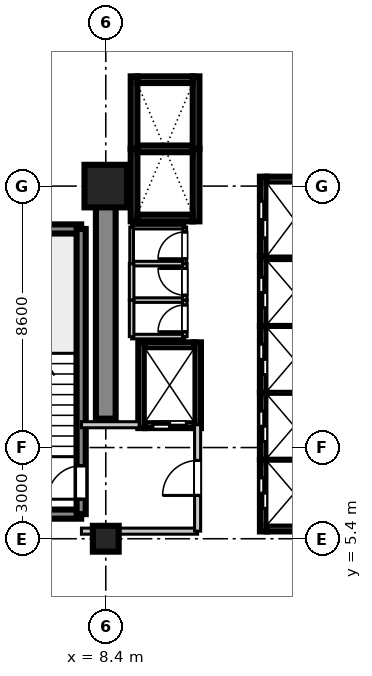
"""IFC4 building model, lengths in metres.
Left out: names, types, materials, properties, quantities, classifications, styles, units other than length and angle.
Written with IfcOpenShell. Run it as: python <this file> out.ifc"""

import sys

from ifc_helpers import new_model, si_unit, direction, frame, frame_2d, origin, origin_2d, place, context, subcontext, project, spatial, rectangle, extrude, source, transform, mapped, element, fill, save


model = new_model("IFC4")
c1 = context("Model", 3, precision=1e-05, world=origin(), true_north=direction((0.0, 1.0)))
c2 = subcontext(c1, "Body", "Model", "MODEL_VIEW")
j1 = project(units=[si_unit("LENGTHUNIT", "METRE"), si_unit("PLANEANGLEUNIT", "RADIAN")], contexts=[c1])
p1 = place(None, origin())
s1 = spatial("IfcSite", under=j1, at=p1, CompositionType="ELEMENT")
p2 = place(p1, origin())
s2 = spatial("IfcBuilding", under=s1, at=p2, CompositionType="ELEMENT")
p3 = place(p2, frame((0.0, 0.0, 54.3)))
s3 = spatial("IfcBuildingStorey", under=s2, at=p3, CompositionType="ELEMENT", Elevation=54.3)
m1 = source(origin(), c2, "Body", "SweptSolid", [
    extrude(rectangle(XDim=0.85, YDim=0.85, at=origin_2d()), origin(), (0.0, 0.0, 1.0), 3.605),
])
p4 = place(p3, frame((8.4, 5.4, 0.0), z_axis=(0.0, 0.0, 1.0), x_axis=(1.0, 0.0, 0.0)))
e1 = element("IfcColumn", 1, at=p4, inside=s3, PredefinedType="PILASTER", context=c2, shape_type="MappedRepresentation", body=[
    mapped(m1, transform((0.0, 0.0, 0.0), scale=1.0)),
])
m2 = source(origin(), c2, "Body", "SweptSolid", [
    extrude(rectangle(XDim=1.4, YDim=1.4, at=origin_2d()), origin(), (0.0, 0.0, 1.0), 3.605),
])
p5 = place(p3, frame((8.4, 17.0, 0.0), z_axis=(0.0, 0.0, 1.0), x_axis=(1.0, 0.0, 0.0)))
e2 = element("IfcColumn", 2, at=p5, inside=s3, PredefinedType="COLUMN", context=c2, shape_type="MappedRepresentation", body=[
    mapped(m2, transform((0.0, 0.0, 0.0), scale=1.0)),
])
m3 = source(origin(), c2, "Body", "SweptSolid", [
    extrude(rectangle(XDim=7.65, YDim=0.65, at=frame_2d((3.825, 0.0))), origin(), (0.0, 0.0, 1.0), 3.37),
])
p6 = place(p3, frame((8.4, 9.35, 0.0), z_axis=(0.0, 0.0, 1.0), x_axis=(0.0, 1.0, 0.0)))
e3 = element("IfcWall", 3, at=p6, inside=s3, PredefinedType="SHEAR", context=c2, shape_type="MappedRepresentation", body=[
    mapped(m3, transform((0.0, 0.0, 0.0), scale=1.0)),
])
m4 = source(origin(), c2, "Body", "SweptSolid", [
    extrude(rectangle(XDim=3.98, YDim=0.3, at=frame_2d((1.99, 0.0))), origin(), (0.0, 0.0, 1.0), 3.37),
])
for number, where, z_axis, x_axis in (
    (4, (3.61, 6.21, 0.0), (0.0, 0.0, 1.0), (1.0, 0.0, 0.0)),
    (5, (3.61, 15.59, 0.0), (0.0, 0.0, 1.0), (1.0, 0.0, 0.0)),
):
    element("IfcWall", number, at=place(p3, frame(where, z_axis=z_axis, x_axis=x_axis)), inside=s3, PredefinedType="SHEAR", context=c2, shape_type="MappedRepresentation", body=[
        mapped(m4, transform((0.0, 0.0, 0.0), scale=1.0)),
    ])
m5 = source(origin(), c2, "Body", "SweptSolid", [
    extrude(rectangle(XDim=9.38, YDim=0.3, at=frame_2d((4.69, 0.0))), origin(), (0.0, 0.0, 1.0), 3.37),
])
p7 = place(p3, frame((7.59, 6.21, 0.0), z_axis=(0.0, 0.0, 1.0), x_axis=(0.0, 1.0, 0.0)))
e6 = element("IfcWall", 6, at=p7, inside=s3, PredefinedType="SHEAR", context=c2, shape_type="MappedRepresentation", body=[
    mapped(m5, transform((0.0, 0.0, 0.0), scale=1.0)),
])
p8 = place(p7, frame((0.49, 0.0, 0.0)))
e7 = element("IfcOpeningElement", 7, at=p8, cuts=e6, PredefinedType="OPENING", context=c2, shape_type="SweptSolid", body=[
    extrude(rectangle(XDim=1.1, YDim=2.15, at=frame_2d((0.55, 1.075))), frame((0.0, 0.16, 0.0), z_axis=(0.0, -1.0, 0.0), x_axis=(1.0, 0.0, 0.0)), (0.0, 0.0, 1.0), 0.32),
])
m6 = source(origin(), c2, "Body", "SweptSolid", [
    extrude(rectangle(XDim=2.36, YDim=0.22, at=frame_2d((1.18, 0.0))), origin(), (0.0, 0.0, 1.0), 3.37),
])
p9 = place(p3, frame((13.58, 5.64, 0.0), z_axis=(0.0, 0.0, 1.0), x_axis=(0.0, 1.0, 0.0)))
e8 = element("IfcWall", 8, at=p9, inside=s3, PredefinedType="SHEAR", context=c2, shape_type="MappedRepresentation", body=[
    mapped(m6, transform((0.0, 0.0, 0.0), scale=1.0)),
])
p10 = place(p9, frame((0.76, 0.0, 0.0)))
e9 = element("IfcOpeningElement", 9, at=p10, cuts=e8, PredefinedType="OPENING", context=c2, shape_type="SweptSolid", body=[
    extrude(rectangle(XDim=1.0, YDim=2.2, at=frame_2d((0.5, 1.1))), frame((0.0, 0.12, 0.0), z_axis=(0.0, -1.0, 0.0), x_axis=(1.0, 0.0, 0.0)), (0.0, 0.0, 1.0), 0.24),
])
m7 = source(origin(), c2, "Body", "SweptSolid", [
    extrude(rectangle(XDim=1.82, YDim=0.22, at=frame_2d((0.91, 0.0))), origin(), (0.0, 0.0, 1.0), 3.37),
])
p11 = place(p3, frame((13.69, 5.75, 0.0), z_axis=(0.0, 0.0, 1.0), x_axis=(1.0, 0.0, 0.0)))
e10 = element("IfcWall", 10, at=p11, inside=s3, PredefinedType="SHEAR", context=c2, shape_type="MappedRepresentation", body=[
    mapped(m7, transform((0.0, 0.0, 0.0), scale=1.0)),
])
m8 = source(origin(), c2, "Body", "SweptSolid", [
    extrude(rectangle(XDim=1.82, YDim=0.22, at=frame_2d((0.91, 0.0))), origin(), (0.0, 0.0, 1.0), 3.65),
])
p12 = place(p3, frame((13.69, 8.0, 0.0), z_axis=(0.0, 0.0, 1.0), x_axis=(1.0, 0.0, 0.0)))
e11 = element("IfcWall", 11, at=p12, inside=s3, PredefinedType="SHEAR", context=c2, shape_type="MappedRepresentation", body=[
    mapped(m8, transform((0.0, 0.0, 0.0), scale=1.0)),
])
m9 = source(origin(), c2, "Body", "SweptSolid", [
    extrude(rectangle(XDim=2.2, YDim=0.22, at=frame_2d((1.1, 0.0))), origin(), (0.0, 0.0, 1.0), 3.37),
])
p13 = place(p3, frame((13.58, 8.0, 0.0), z_axis=(0.0, 0.0, 1.0), x_axis=(0.0, 1.0, 0.0)))
e12 = element("IfcWall", 12, at=p13, inside=s3, PredefinedType="SHEAR", context=c2, shape_type="MappedRepresentation", body=[
    mapped(m9, transform((0.0, 0.0, 0.0), scale=1.0)),
])
p14 = place(p13, frame((0.6, 0.0, 0.0)))
e13 = element("IfcOpeningElement", 13, at=p14, cuts=e12, PredefinedType="OPENING", context=c2, shape_type="SweptSolid", body=[
    extrude(rectangle(XDim=1.0, YDim=2.2, at=frame_2d((0.5, 1.1))), frame((0.0, 0.12, 0.0), z_axis=(0.0, -1.0, 0.0), x_axis=(1.0, 0.0, 0.0)), (0.0, 0.0, 1.0), 0.24),
])
p15 = place(p3, frame((13.69, 10.2, 0.0), z_axis=(0.0, 0.0, 1.0), x_axis=(1.0, 0.0, 0.0)))
e14 = element("IfcWall", 14, at=p15, inside=s3, PredefinedType="SHEAR", context=c2, shape_type="MappedRepresentation", body=[
    mapped(m8, transform((0.0, 0.0, 0.0), scale=1.0)),
])
p16 = place(p3, frame((13.58, 10.2, 0.0), z_axis=(0.0, 0.0, 1.0), x_axis=(0.0, 1.0, 0.0)))
e15 = element("IfcWall", 15, at=p16, inside=s3, PredefinedType="SHEAR", context=c2, shape_type="MappedRepresentation", body=[
    mapped(m9, transform((0.0, 0.0, 0.0), scale=1.0)),
])
p17 = place(p16, frame((0.6, 0.0, 0.0)))
e16 = element("IfcOpeningElement", 16, at=p17, cuts=e15, PredefinedType="OPENING", context=c2, shape_type="SweptSolid", body=[
    extrude(rectangle(XDim=1.0, YDim=2.2, at=frame_2d((0.5, 1.1))), frame((0.0, 0.12, 0.0), z_axis=(0.0, -1.0, 0.0), x_axis=(1.0, 0.0, 0.0)), (0.0, 0.0, 1.0), 0.24),
])
p18 = place(p3, frame((13.69, 12.4, 0.0), z_axis=(0.0, 0.0, 1.0), x_axis=(1.0, 0.0, 0.0)))
e17 = element("IfcWall", 17, at=p18, inside=s3, PredefinedType="SHEAR", context=c2, shape_type="MappedRepresentation", body=[
    mapped(m8, transform((0.0, 0.0, 0.0), scale=1.0)),
])
m10 = source(origin(), c2, "Body", "SweptSolid", [
    extrude(rectangle(XDim=2.3, YDim=0.22, at=frame_2d((1.15, 0.0))), origin(), (0.0, 0.0, 1.0), 3.37),
])
p19 = place(p3, frame((13.58, 12.4, 0.0), z_axis=(0.0, 0.0, 1.0), x_axis=(0.0, 1.0, 0.0)))
e18 = element("IfcWall", 18, at=p19, inside=s3, PredefinedType="SHEAR", context=c2, shape_type="MappedRepresentation", body=[
    mapped(m10, transform((0.0, 0.0, 0.0), scale=1.0)),
])
p20 = place(p19, frame((0.6, 0.0, 0.0)))
e19 = element("IfcOpeningElement", 19, at=p20, cuts=e18, PredefinedType="OPENING", context=c2, shape_type="SweptSolid", body=[
    extrude(rectangle(XDim=1.0, YDim=2.2, at=frame_2d((0.5, 1.1))), frame((0.0, 0.12, 0.0), z_axis=(0.0, -1.0, 0.0), x_axis=(1.0, 0.0, 0.0)), (0.0, 0.0, 1.0), 0.24),
])
p21 = place(p3, frame((13.69, 14.7, 0.0), z_axis=(0.0, 0.0, 1.0), x_axis=(1.0, 0.0, 0.0)))
e20 = element("IfcWall", 20, at=p21, inside=s3, PredefinedType="SHEAR", context=c2, shape_type="MappedRepresentation", body=[
    mapped(m8, transform((0.0, 0.0, 0.0), scale=1.0)),
])
m11 = source(origin(), c2, "Body", "SweptSolid", [
    extrude(rectangle(XDim=2.385, YDim=0.22, at=frame_2d((1.192, 0.0))), origin(), (0.0, 0.0, 1.0), 3.37),
])
for number, where, z_axis, x_axis in (
    (21, (9.33, 15.84, 0.0), (0.0, 0.0, 1.0), (0.0, 1.0, 0.0)),
    (22, (11.37, 15.84, 0.0), (0.0, 0.0, 1.0), (0.0, 1.0, 0.0)),
):
    element("IfcWall", number, at=place(p3, frame(where, z_axis=z_axis, x_axis=x_axis)), inside=s3, PredefinedType="SHEAR", context=c2, shape_type="MappedRepresentation", body=[
        mapped(m11, transform((0.0, 0.0, 0.0), scale=1.0)),
    ])
p22 = place(p3, frame((9.44, 15.95, 0.0), z_axis=(0.0, 0.0, 1.0), x_axis=(1.0, 0.0, 0.0)))
e23 = element("IfcWall", 23, at=p22, inside=s3, PredefinedType="SHEAR", context=c2, shape_type="MappedRepresentation", body=[
    mapped(m7, transform((0.0, 0.0, 0.0), scale=1.0)),
])
p23 = place(p3, frame((9.44, 18.225, 0.0), z_axis=(0.0, 0.0, 1.0), x_axis=(1.0, 0.0, 0.0)))
e24 = element("IfcWall", 24, at=p23, inside=s3, PredefinedType="SHEAR", context=c2, shape_type="MappedRepresentation", body=[
    mapped(m8, transform((0.0, 0.0, 0.0), scale=1.0)),
])
for number, where, z_axis, x_axis in (
    (25, (9.33, 18.225, 0.0), (0.0, 0.0, 1.0), (0.0, 1.0, 0.0)),
    (26, (11.37, 18.225, 0.0), (0.0, 0.0, 1.0), (0.0, 1.0, 0.0)),
):
    element("IfcWall", number, at=place(p3, frame(where, z_axis=z_axis, x_axis=x_axis)), inside=s3, PredefinedType="SHEAR", context=c2, shape_type="MappedRepresentation", body=[
        mapped(m11, transform((0.0, 0.0, 0.0), scale=1.0)),
    ])
p24 = place(p3, frame((9.44, 20.5, 0.0), z_axis=(0.0, 0.0, 1.0), x_axis=(1.0, 0.0, 0.0)))
e27 = element("IfcWall", 27, at=p24, inside=s3, PredefinedType="SHEAR", context=c2, shape_type="MappedRepresentation", body=[
    mapped(m7, transform((0.0, 0.0, 0.0), scale=1.0)),
])
m12 = source(origin(), c2, "Body", "SweptSolid", [
    extrude(rectangle(XDim=2.82, YDim=0.22, at=frame_2d((1.41, 0.0))), origin(), (0.0, 0.0, 1.0), 3.37),
])
for number, where, z_axis, x_axis in (
    (28, (9.58, 9.04, 0.0), (0.0, 0.0, 1.0), (0.0, 1.0, 0.0)),
    (29, (11.42, 9.04, 0.0), (0.0, 0.0, 1.0), (0.0, 1.0, 0.0)),
):
    element("IfcWall", number, at=place(p3, frame(where, z_axis=z_axis, x_axis=x_axis)), inside=s3, PredefinedType="SHEAR", context=c2, shape_type="MappedRepresentation", body=[
        mapped(m12, transform((0.0, 0.0, 0.0), scale=1.0)),
    ])
m13 = source(origin(), c2, "Body", "SweptSolid", [
    extrude(rectangle(XDim=1.62, YDim=0.22, at=frame_2d((0.81, 0.0))), origin(), (0.0, 0.0, 1.0), 3.37),
])
p25 = place(p3, frame((9.69, 9.15, 0.0), z_axis=(0.0, 0.0, 1.0), x_axis=(1.0, 0.0, 0.0)))
e30 = element("IfcWall", 30, at=p25, inside=s3, PredefinedType="SHEAR", context=c2, shape_type="MappedRepresentation", body=[
    mapped(m13, transform((0.0, 0.0, 0.0), scale=1.0)),
])
p26 = place(p25, frame((0.26, 0.0, 0.0)))
e31 = element("IfcOpeningElement", 31, at=p26, cuts=e30, PredefinedType="OPENING", context=c2, shape_type="SweptSolid", body=[
    extrude(rectangle(XDim=1.1, YDim=2.2, at=frame_2d((0.55, 1.1))), frame((0.0, 0.12, 0.0), z_axis=(0.0, -1.0, 0.0), x_axis=(1.0, 0.0, 0.0)), (0.0, 0.0, 1.0), 0.24),
])
p27 = place(p3, frame((9.69, 11.75, 0.0), z_axis=(0.0, 0.0, 1.0), x_axis=(1.0, 0.0, 0.0)))
e32 = element("IfcWall", 32, at=p27, inside=s3, PredefinedType="SHEAR", context=c2, shape_type="MappedRepresentation", body=[
    mapped(m13, transform((0.0, 0.0, 0.0), scale=1.0)),
])
m14 = source(origin(), c2, "Body", "SweptSolid", [
    extrude(rectangle(XDim=2.61, YDim=0.22, at=frame_2d((1.305, 0.0))), origin(), (0.0, 0.0, 1.0), 3.37),
])
p28 = place(p3, frame((13.58, 14.7, 0.0), z_axis=(0.0, 0.0, 1.0), x_axis=(0.0, 1.0, 0.0)))
e33 = element("IfcWall", 33, at=p28, inside=s3, PredefinedType="SHEAR", context=c2, shape_type="MappedRepresentation", body=[
    mapped(m14, transform((0.0, 0.0, 0.0), scale=1.0)),
])
p29 = place(p28, frame((0.6, 0.0, 0.0)))
e34 = element("IfcOpeningElement", 34, at=p29, cuts=e33, PredefinedType="OPENING", context=c2, shape_type="SweptSolid", body=[
    extrude(rectangle(XDim=1.2, YDim=2.2, at=frame_2d((0.6, 1.1))), frame((0.0, 0.12, 0.0), z_axis=(0.0, -1.0, 0.0), x_axis=(1.0, 0.0, 0.0)), (0.0, 0.0, 1.0), 0.24),
])
p30 = place(p3, frame((13.69, 17.2, 0.0), z_axis=(0.0, 0.0, 1.0), x_axis=(1.0, 0.0, 0.0)))
e35 = element("IfcWall", 35, at=p30, inside=s3, PredefinedType="SHEAR", context=c2, shape_type="MappedRepresentation", body=[
    mapped(m7, transform((0.0, 0.0, 0.0), scale=1.0)),
])
m15 = source(origin(), c2, "Body", "SweptSolid", [
    extrude(rectangle(XDim=3.82, YDim=0.2, at=frame_2d((1.91, 0.0))), origin(), (0.0, 0.0, 1.0), 2.71),
])
p31 = place(p3, frame((7.6, 5.65, 0.0), z_axis=(0.0, 0.0, 1.0), x_axis=(1.0, 0.0, 0.0)))
e36 = element("IfcWall", 36, at=p31, inside=s3, PredefinedType="PARTITIONING", context=c2, shape_type="MappedRepresentation", body=[
    mapped(m15, transform((0.0, 0.0, 0.0), scale=1.0)),
])
m16 = source(origin(), c2, "Body", "SweptSolid", [
    extrude(rectangle(XDim=1.9, YDim=0.2, at=frame_2d((0.95, 0.0))), origin(), (0.0, 0.0, 1.0), 2.71),
])
p32 = place(p3, frame((7.6, 9.15, 0.0), z_axis=(0.0, 0.0, 1.0), x_axis=(1.0, 0.0, 0.0)))
e37 = element("IfcWall", 37, at=p32, inside=s3, PredefinedType="PARTITIONING", context=c2, shape_type="MappedRepresentation", body=[
    mapped(m16, transform((0.0, 0.0, 0.0), scale=1.0)),
])
m17 = source(origin(), c2, "Body", "SweptSolid", [
    extrude(rectangle(XDim=3.5, YDim=0.2, at=frame_2d((1.75, 0.0))), origin(), (0.0, 0.0, 1.0), 2.71),
])
p33 = place(p3, frame((11.42, 5.65, 0.0), z_axis=(0.0, 0.0, 1.0), x_axis=(0.0, 1.0, 0.0)))
e38 = element("IfcWall", 38, at=p33, inside=s3, PredefinedType="PARTITIONING", context=c2, shape_type="MappedRepresentation", body=[
    mapped(m17, transform((0.0, 0.0, 0.0), scale=1.0)),
])
p34 = place(p33, frame((1.175, 0.0, 0.0)))
e39 = element("IfcOpeningElement", 39, at=p34, cuts=e38, PredefinedType="OPENING", context=c2, shape_type="SweptSolid", body=[
    extrude(rectangle(XDim=1.15, YDim=2.15, at=frame_2d((0.575, 1.075))), frame((0.0, 0.11, 0.0), z_axis=(0.0, -1.0, 0.0), x_axis=(1.0, 0.0, 0.0)), (0.0, 0.0, 1.0), 0.22),
])
m18 = source(origin(), c2, "Body", "SweptSolid", [
    extrude(rectangle(XDim=1.75, YDim=0.15, at=frame_2d((0.875, 0.0))), origin(), (0.0, 0.0, 1.0), 2.71),
])
for number, where, z_axis, x_axis in (
    (40, (9.25, 12.05, 0.0), (0.0, 0.0, 1.0), (1.0, 0.0, 0.0)),
    (41, (9.25, 13.25, 0.0), (0.0, 0.0, 1.0), (1.0, 0.0, 0.0)),
):
    element("IfcWall", number, at=place(p3, frame(where, z_axis=z_axis, x_axis=x_axis)), inside=s3, PredefinedType="PARTITIONING", context=c2, shape_type="MappedRepresentation", body=[
        mapped(m18, transform((0.0, 0.0, 0.0), scale=1.0)),
    ])
m19 = source(origin(), c2, "Body", "SweptSolid", [
    extrude(rectangle(XDim=1.2, YDim=0.15, at=frame_2d((0.6, 0.0))), origin(), (0.0, 0.0, 1.0), 2.71),
])
p35 = place(p3, frame((9.25, 12.05, 0.0), z_axis=(0.0, 0.0, 1.0), x_axis=(0.0, 1.0, 0.0)))
e42 = element("IfcWall", 42, at=p35, inside=s3, PredefinedType="PARTITIONING", context=c2, shape_type="MappedRepresentation", body=[
    mapped(m19, transform((0.0, 0.0, 0.0), scale=1.0)),
])
p36 = place(p3, frame((11.0, 12.05, 0.0), z_axis=(0.0, 0.0, 1.0), x_axis=(0.0, 1.0, 0.0)))
e43 = element("IfcWall", 43, at=p36, inside=s3, PredefinedType="PARTITIONING", context=c2, shape_type="MappedRepresentation", body=[
    mapped(m19, transform((0.0, 0.0, 0.0), scale=1.0)),
])
p37 = place(p36, frame((0.16, 0.0, 0.0)))
e44 = element("IfcOpeningElement", 44, at=p37, cuts=e43, PredefinedType="OPENING", context=c2, shape_type="SweptSolid", body=[
    extrude(rectangle(XDim=0.88, YDim=2.1, at=frame_2d((0.44, 1.05))), frame((0.0, 0.085, 0.0), z_axis=(0.0, -1.0, 0.0), x_axis=(1.0, 0.0, 0.0)), (0.0, 0.0, 1.0), 0.17),
])
p38 = place(p3, frame((9.25, 14.45, 0.0), z_axis=(0.0, 0.0, 1.0), x_axis=(1.0, 0.0, 0.0)))
e45 = element("IfcWall", 45, at=p38, inside=s3, PredefinedType="PARTITIONING", context=c2, shape_type="MappedRepresentation", body=[
    mapped(m18, transform((0.0, 0.0, 0.0), scale=1.0)),
])
p39 = place(p3, frame((9.25, 13.25, 0.0), z_axis=(0.0, 0.0, 1.0), x_axis=(0.0, 1.0, 0.0)))
e46 = element("IfcWall", 46, at=p39, inside=s3, PredefinedType="PARTITIONING", context=c2, shape_type="MappedRepresentation", body=[
    mapped(m19, transform((0.0, 0.0, 0.0), scale=1.0)),
])
p40 = place(p3, frame((11.0, 13.25, 0.0), z_axis=(0.0, 0.0, 1.0), x_axis=(0.0, 1.0, 0.0)))
e47 = element("IfcWall", 47, at=p40, inside=s3, PredefinedType="PARTITIONING", context=c2, shape_type="MappedRepresentation", body=[
    mapped(m19, transform((0.0, 0.0, 0.0), scale=1.0)),
])
p41 = place(p40, frame((0.16, 0.0, 0.0)))
e48 = element("IfcOpeningElement", 48, at=p41, cuts=e47, PredefinedType="OPENING", context=c2, shape_type="SweptSolid", body=[
    extrude(rectangle(XDim=0.88, YDim=2.1, at=frame_2d((0.44, 1.05))), frame((0.0, 0.085, 0.0), z_axis=(0.0, -1.0, 0.0), x_axis=(1.0, 0.0, 0.0)), (0.0, 0.0, 1.0), 0.17),
])
m20 = source(origin(), c2, "Body", "SweptSolid", [
    extrude(rectangle(XDim=1.75, YDim=0.12, at=frame_2d((0.875, 0.0))), origin(), (0.0, 0.0, 1.0), 2.71),
])
p42 = place(p3, frame((9.25, 15.65, 0.0), z_axis=(0.0, 0.0, 1.0), x_axis=(1.0, 0.0, 0.0)))
e49 = element("IfcWall", 49, at=p42, inside=s3, PredefinedType="PARTITIONING", context=c2, shape_type="MappedRepresentation", body=[
    mapped(m20, transform((0.0, 0.0, 0.0), scale=1.0)),
])
m21 = source(origin(), c2, "Body", "SweptSolid", [
    extrude(rectangle(XDim=1.2, YDim=0.12, at=frame_2d((0.6, 0.0))), origin(), (0.0, 0.0, 1.0), 2.71),
])
p43 = place(p3, frame((9.25, 14.45, 0.0), z_axis=(0.0, 0.0, 1.0), x_axis=(0.0, 1.0, 0.0)))
e50 = element("IfcWall", 50, at=p43, inside=s3, PredefinedType="PARTITIONING", context=c2, shape_type="MappedRepresentation", body=[
    mapped(m21, transform((0.0, 0.0, 0.0), scale=1.0)),
])
p44 = place(p3, frame((11.0, 14.45, 0.0), z_axis=(0.0, 0.0, 1.0), x_axis=(0.0, 1.0, 0.0)))
e51 = element("IfcWall", 51, at=p44, inside=s3, PredefinedType="PARTITIONING", context=c2, shape_type="MappedRepresentation", body=[
    mapped(m21, transform((0.0, 0.0, 0.0), scale=1.0)),
])
p45 = place(p44, frame((0.16, 0.0, 0.0)))
e52 = element("IfcOpeningElement", 52, at=p45, cuts=e51, PredefinedType="OPENING", context=c2, shape_type="SweptSolid", body=[
    extrude(rectangle(XDim=0.88, YDim=2.1, at=frame_2d((0.44, 1.05))), frame((0.0, 0.07, 0.0), z_axis=(0.0, -1.0, 0.0), x_axis=(1.0, 0.0, 0.0)), (0.0, 0.0, 1.0), 0.14),
])
m22 = source(origin(), c2, "Body", "SweptSolid", [
    extrude(rectangle(XDim=1.1, YDim=2.15, at=frame_2d((0.55, 1.075))), frame((0.0, 0.025, 0.0), z_axis=(0.0, -1.0, 0.0), x_axis=(1.0, 0.0, 0.0)), (0.0, 0.0, 1.0), 0.05),
])
p46 = place(p8, origin())
e53 = element("IfcDoor", 53, at=p46, inside=s3, OperationType="SINGLE_SWING_LEFT", PredefinedType="DOOR", context=c2, shape_type="MappedRepresentation", body=[
    mapped(m22, transform((0.0, 0.0, 0.0), scale=1.0)),
])
fill(e7, e53)
m23 = source(origin(), c2, "Body", "SweptSolid", [
    extrude(rectangle(XDim=1.0, YDim=2.2, at=frame_2d((0.5, 1.1))), frame((0.0, 0.025, 0.0), z_axis=(0.0, -1.0, 0.0), x_axis=(1.0, 0.0, 0.0)), (0.0, 0.0, 1.0), 0.05),
])
p47 = place(p10, origin())
e54 = element("IfcDoor", 54, at=p47, inside=s3, OperationType="DOUBLE_DOOR_SLIDING", PredefinedType="DOOR", context=c2, shape_type="MappedRepresentation", body=[
    mapped(m23, transform((0.0, 0.0, 0.0), scale=1.0)),
])
fill(e9, e54)
p48 = place(p14, origin())
e55 = element("IfcDoor", 55, at=p48, inside=s3, OperationType="DOUBLE_DOOR_SLIDING", PredefinedType="DOOR", context=c2, shape_type="MappedRepresentation", body=[
    mapped(m23, transform((0.0, 0.0, 0.0), scale=1.0)),
])
fill(e13, e55)
p49 = place(p17, origin())
e56 = element("IfcDoor", 56, at=p49, inside=s3, OperationType="DOUBLE_DOOR_SLIDING", PredefinedType="DOOR", context=c2, shape_type="MappedRepresentation", body=[
    mapped(m23, transform((0.0, 0.0, 0.0), scale=1.0)),
])
fill(e16, e56)
p50 = place(p20, origin())
e57 = element("IfcDoor", 57, at=p50, inside=s3, OperationType="DOUBLE_DOOR_SLIDING", PredefinedType="DOOR", context=c2, shape_type="MappedRepresentation", body=[
    mapped(m23, transform((0.0, 0.0, 0.0), scale=1.0)),
])
fill(e19, e57)
m24 = source(origin(), c2, "Body", "SweptSolid", [
    extrude(rectangle(XDim=1.1, YDim=2.2, at=frame_2d((0.55, 1.1))), frame((0.0, 0.025, 0.0), z_axis=(0.0, -1.0, 0.0), x_axis=(1.0, 0.0, 0.0)), (0.0, 0.0, 1.0), 0.05),
])
p51 = place(p26, frame((1.1, 0.0, 0.0), z_axis=(0.0, 0.0, 1.0), x_axis=(-1.0, 0.0, 0.0)))
e58 = element("IfcDoor", 58, at=p51, inside=s3, OperationType="DOUBLE_DOOR_SLIDING", PredefinedType="DOOR", context=c2, shape_type="MappedRepresentation", body=[
    mapped(m24, transform((0.0, 0.0, 0.0), scale=1.0)),
])
fill(e31, e58)
m25 = source(origin(), c2, "Body", "SweptSolid", [
    extrude(rectangle(XDim=1.2, YDim=2.2, at=frame_2d((0.6, 1.1))), frame((0.0, 0.025, 0.0), z_axis=(0.0, -1.0, 0.0), x_axis=(1.0, 0.0, 0.0)), (0.0, 0.0, 1.0), 0.05),
])
p52 = place(p29, origin())
e59 = element("IfcDoor", 59, at=p52, inside=s3, OperationType="DOUBLE_DOOR_SLIDING", PredefinedType="DOOR", context=c2, shape_type="MappedRepresentation", body=[
    mapped(m25, transform((0.0, 0.0, 0.0), scale=1.0)),
])
fill(e34, e59)
m26 = source(origin(), c2, "Body", "SweptSolid", [
    extrude(rectangle(XDim=1.15, YDim=2.15, at=frame_2d((0.575, 1.075))), frame((0.0, 0.025, 0.0), z_axis=(0.0, -1.0, 0.0), x_axis=(1.0, 0.0, 0.0)), (0.0, 0.0, 1.0), 0.05),
])
p53 = place(p34, frame((1.15, 0.0, 0.0), z_axis=(0.0, 0.0, 1.0), x_axis=(-1.0, 0.0, 0.0)))
e60 = element("IfcDoor", 60, at=p53, inside=s3, OperationType="SINGLE_SWING_LEFT", PredefinedType="DOOR", context=c2, shape_type="MappedRepresentation", body=[
    mapped(m26, transform((0.0, 0.0, 0.0), scale=1.0)),
])
fill(e39, e60)
m27 = source(origin(), c2, "Body", "SweptSolid", [
    extrude(rectangle(XDim=0.88, YDim=2.1, at=frame_2d((0.44, 1.05))), frame((0.0, 0.025, 0.0), z_axis=(0.0, -1.0, 0.0), x_axis=(1.0, 0.0, 0.0)), (0.0, 0.0, 1.0), 0.05),
])
p54 = place(p37, origin())
e61 = element("IfcDoor", 61, at=p54, inside=s3, OperationType="SINGLE_SWING_LEFT", PredefinedType="DOOR", context=c2, shape_type="MappedRepresentation", body=[
    mapped(m27, transform((0.0, 0.0, 0.0), scale=1.0)),
])
fill(e44, e61)
p55 = place(p41, origin())
e62 = element("IfcDoor", 62, at=p55, inside=s3, OperationType="SINGLE_SWING_RIGHT", PredefinedType="DOOR", context=c2, shape_type="MappedRepresentation", body=[
    mapped(m27, transform((0.0, 0.0, 0.0), scale=1.0)),
])
fill(e48, e62)
p56 = place(p45, origin())
e63 = element("IfcDoor", 63, at=p56, inside=s3, OperationType="SINGLE_SWING_LEFT", PredefinedType="DOOR", context=c2, shape_type="MappedRepresentation", body=[
    mapped(m27, transform((0.0, 0.0, 0.0), scale=1.0)),
])
fill(e52, e63)
save(model, sys.argv[1])
